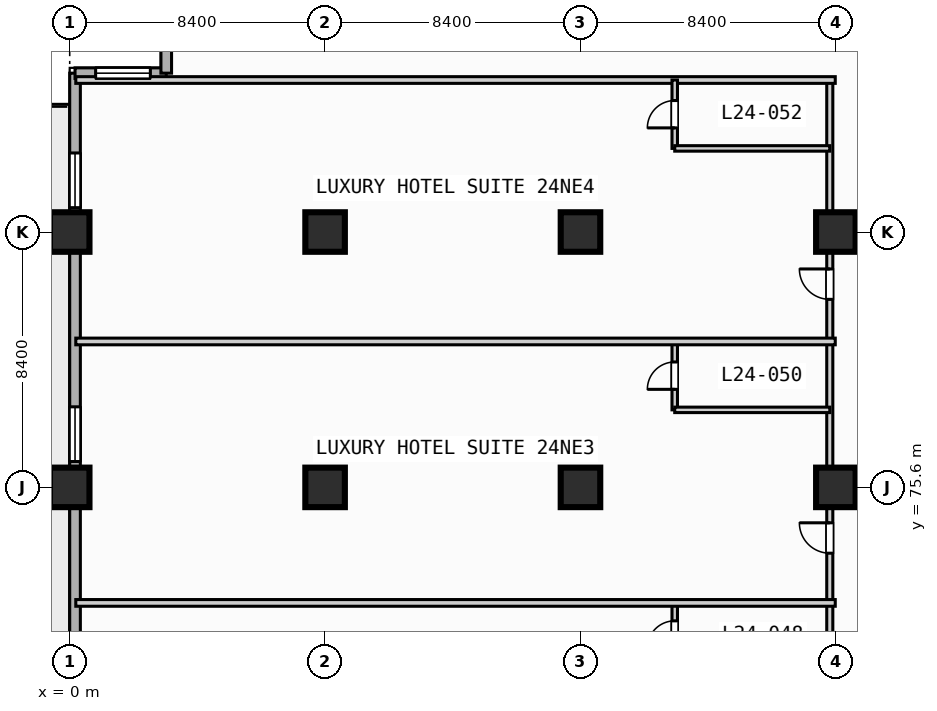
"""IFC4 building model, lengths in metres.
Left out: names, types, materials, properties, quantities, classifications, styles, units other than length and angle.
Written with IfcOpenShell. Run it as: python <this file> out.ifc"""

import sys

from ifc_helpers import new_model, si_unit, direction, frame, frame_2d, origin, origin_2d, place, context, subcontext, project, spatial, rectangle, extrude, element, fill, save


model = new_model("IFC4")
c1 = context("Model", 3, precision=1e-05, world=origin(), true_north=direction((0.0, 1.0)))
c2 = subcontext(c1, "Body", "Model", "MODEL_VIEW")
j1 = project(units=[si_unit("LENGTHUNIT", "METRE"), si_unit("PLANEANGLEUNIT", "RADIAN")], contexts=[c1])
p1 = place(None, origin())
s1 = spatial("IfcSite", under=j1, at=p1, CompositionType="ELEMENT")
p2 = place(p1, origin())
s2 = spatial("IfcBuilding", under=s1, at=p2, CompositionType="ELEMENT")
p3 = place(p2, frame((0.0, 0.0, 103.8)))
s3 = spatial("IfcBuildingStorey", under=s2, at=p3, CompositionType="ELEMENT", Elevation=103.8)
for number, where, z_axis, x_axis in (
    (1, (0.0, 75.6, 0.0), (0.0, 0.0, 1.0), (1.0, 0.0, 0.0)),
    (2, (0.0, 84.0, 0.0), (0.0, 0.0, 1.0), (1.0, 0.0, 0.0)),
    (3, (8.4, 75.6, 0.0), (0.0, 0.0, 1.0), (1.0, 0.0, 0.0)),
    (4, (8.4, 84.0, 0.0), (0.0, 0.0, 1.0), (1.0, 0.0, 0.0)),
    (5, (16.8, 75.6, 0.0), (0.0, 0.0, 1.0), (1.0, 0.0, 0.0)),
    (6, (16.8, 84.0, 0.0), (0.0, 0.0, 1.0), (1.0, 0.0, 0.0)),
    (7, (25.2, 75.6, 0.0), (0.0, 0.0, 1.0), (1.0, 0.0, 0.0)),
    (8, (25.2, 84.0, 0.0), (0.0, 0.0, 1.0), (1.0, 0.0, 0.0)),
):
    element("IfcColumn", number, at=place(p3, frame(where, z_axis=z_axis, x_axis=x_axis)), inside=s3, PredefinedType="COLUMN", context=c2, shape_type="SweptSolid", body=[
        extrude(rectangle(XDim=1.3, YDim=1.3, at=origin_2d()), origin(), (0.0, 0.0, 1.0), 3.8),
    ])
p4 = place(p3, frame((0.175, 3.175, 0.0), z_axis=(0.0, 0.0, 1.0), x_axis=(0.0, 1.0, 0.0)))
e9 = element("IfcWall", 9, at=p4, inside=s3, PredefinedType="STANDARD", context=c2, shape_type="SweptSolid", body=[
    extrude(rectangle(XDim=86.05, YDim=0.35, at=frame_2d((43.025, 0.0))), origin(), (0.0, 0.0, 1.0), 3.55),
])
p5 = place(p4, frame((42.325, 0.0, 0.0)))
e10 = element("IfcOpeningElement", 10, at=p5, cuts=e9, PredefinedType="OPENING", context=c2, shape_type="SweptSolid", body=[
    extrude(rectangle(XDim=1.4, YDim=2.2, at=frame_2d((0.7, 1.1))), frame((0.0, 0.185, 0.0), z_axis=(0.0, -1.0, 0.0), x_axis=(1.0, 0.0, 0.0)), (0.0, 0.0, 1.0), 0.37),
])
p6 = place(p4, frame((25.125, 0.0, 0.85)))
e11 = element("IfcOpeningElement", 11, at=p6, cuts=e9, PredefinedType="OPENING", context=c2, shape_type="SweptSolid", body=[
    extrude(rectangle(XDim=2.2, YDim=1.8, at=frame_2d((1.1, 0.9))), frame((0.0, 0.185, 0.0), z_axis=(0.0, -1.0, 0.0), x_axis=(1.0, 0.0, 0.0)), (0.0, 0.0, 1.0), 0.37),
])
p7 = place(p4, frame((33.525, 0.0, 0.85)))
e12 = element("IfcOpeningElement", 12, at=p7, cuts=e9, PredefinedType="OPENING", context=c2, shape_type="SweptSolid", body=[
    extrude(rectangle(XDim=2.2, YDim=1.8, at=frame_2d((1.1, 0.9))), frame((0.0, 0.185, 0.0), z_axis=(0.0, -1.0, 0.0), x_axis=(1.0, 0.0, 0.0)), (0.0, 0.0, 1.0), 0.37),
])
p8 = place(p4, frame((58.725, 0.0, 0.85)))
e13 = element("IfcOpeningElement", 13, at=p8, cuts=e9, PredefinedType="OPENING", context=c2, shape_type="SweptSolid", body=[
    extrude(rectangle(XDim=2.2, YDim=1.8, at=frame_2d((1.1, 0.9))), frame((0.0, 0.185, 0.0), z_axis=(0.0, -1.0, 0.0), x_axis=(1.0, 0.0, 0.0)), (0.0, 0.0, 1.0), 0.37),
])
p9 = place(p4, frame((65.125, 0.0, 0.85)))
e14 = element("IfcOpeningElement", 14, at=p9, cuts=e9, PredefinedType="OPENING", context=c2, shape_type="SweptSolid", body=[
    extrude(rectangle(XDim=1.8, YDim=1.8, at=frame_2d((0.9, 0.9))), frame((0.0, 0.185, 0.0), z_axis=(0.0, -1.0, 0.0), x_axis=(1.0, 0.0, 0.0)), (0.0, 0.0, 1.0), 0.37),
])
p10 = place(p4, frame((73.275, 0.0, 0.85)))
e15 = element("IfcOpeningElement", 15, at=p10, cuts=e9, PredefinedType="OPENING", context=c2, shape_type="SweptSolid", body=[
    extrude(rectangle(XDim=1.8, YDim=1.8, at=frame_2d((0.9, 0.9))), frame((0.0, 0.185, 0.0), z_axis=(0.0, -1.0, 0.0), x_axis=(1.0, 0.0, 0.0)), (0.0, 0.0, 1.0), 0.37),
])
p11 = place(p4, frame((81.625, 0.0, 0.85)))
e16 = element("IfcOpeningElement", 16, at=p11, cuts=e9, PredefinedType="OPENING", context=c2, shape_type="SweptSolid", body=[
    extrude(rectangle(XDim=1.8, YDim=1.8, at=frame_2d((0.9, 0.9))), frame((0.0, 0.185, 0.0), z_axis=(0.0, -1.0, 0.0), x_axis=(1.0, 0.0, 0.0)), (0.0, 0.0, 1.0), 0.37),
])
p12 = place(p3, frame((0.175, 89.225, 0.0), z_axis=(0.0, 0.0, 1.0), x_axis=(1.0, 0.0, 0.0)))
e17 = element("IfcWall", 17, at=p12, inside=s3, PredefinedType="STANDARD", context=c2, shape_type="SweptSolid", body=[
    extrude(rectangle(XDim=3.0, YDim=0.35, at=frame_2d((1.5, 0.0))), origin(), (0.0, 0.0, 1.0), 3.55),
])
p13 = place(p12, frame((0.677, 0.0, 0.85)))
e18 = element("IfcOpeningElement", 18, at=p13, cuts=e17, PredefinedType="OPENING", context=c2, shape_type="SweptSolid", body=[
    extrude(rectangle(XDim=1.8, YDim=1.8, at=frame_2d((0.9, 0.9))), frame((0.0, 0.185, 0.0), z_axis=(0.0, -1.0, 0.0), x_axis=(1.0, 0.0, 0.0)), (0.0, 0.0, 1.0), 0.37),
])
p14 = place(p3, frame((3.175, 89.225, 0.0), z_axis=(0.0, 0.0, 1.0), x_axis=(0.0, 1.0, 0.0)))
e19 = element("IfcWall", 19, at=p14, inside=s3, PredefinedType="STANDARD", context=c2, shape_type="SweptSolid", body=[
    extrude(rectangle(XDim=3.0, YDim=0.35, at=frame_2d((1.5, 0.0))), origin(), (0.0, 0.0, 1.0), 3.55),
])
p15 = place(p3, frame((25.0, 61.4, 0.0), z_axis=(0.0, 0.0, 1.0), x_axis=(0.0, 1.0, 0.0)))
e20 = element("IfcWall", 20, at=p15, inside=s3, PredefinedType="PARTITIONING", context=c2, shape_type="SweptSolid", body=[
    extrude(rectangle(XDim=27.6, YDim=0.2, at=frame_2d((13.8, 0.0))), origin(), (0.0, 0.0, 1.0), 2.8),
])
p16 = place(p15, frame((3.18, 0.0, 0.0)))
e21 = element("IfcOpeningElement", 21, at=p16, cuts=e20, PredefinedType="OPENING", context=c2, shape_type="SweptSolid", body=[
    extrude(rectangle(XDim=1.0, YDim=2.15, at=frame_2d((0.5, 1.075))), frame((0.0, 0.11, 0.0), z_axis=(0.0, -1.0, 0.0), x_axis=(1.0, 0.0, 0.0)), (0.0, 0.0, 1.0), 0.22),
])
p17 = place(p15, frame((6.97, 0.0, 0.0)))
e22 = element("IfcOpeningElement", 22, at=p17, cuts=e20, PredefinedType="OPENING", context=c2, shape_type="SweptSolid", body=[
    extrude(rectangle(XDim=1.0, YDim=2.15, at=frame_2d((0.5, 1.075))), frame((0.0, 0.11, 0.0), z_axis=(0.0, -1.0, 0.0), x_axis=(1.0, 0.0, 0.0)), (0.0, 0.0, 1.0), 0.22),
])
p18 = place(p15, frame((12.035, 0.0, 0.0)))
e23 = element("IfcOpeningElement", 23, at=p18, cuts=e20, PredefinedType="OPENING", context=c2, shape_type="SweptSolid", body=[
    extrude(rectangle(XDim=1.0, YDim=2.15, at=frame_2d((0.5, 1.075))), frame((0.0, 0.11, 0.0), z_axis=(0.0, -1.0, 0.0), x_axis=(1.0, 0.0, 0.0)), (0.0, 0.0, 1.0), 0.22),
])
p19 = place(p15, frame((20.385, 0.0, 0.0)))
e24 = element("IfcOpeningElement", 24, at=p19, cuts=e20, PredefinedType="OPENING", context=c2, shape_type="SweptSolid", body=[
    extrude(rectangle(XDim=1.0, YDim=2.15, at=frame_2d((0.5, 1.075))), frame((0.0, 0.11, 0.0), z_axis=(0.0, -1.0, 0.0), x_axis=(1.0, 0.0, 0.0)), (0.0, 0.0, 1.0), 0.22),
])
p20 = place(p3, frame((19.9, 69.72, 0.0), z_axis=(0.0, 0.0, 1.0), x_axis=(0.0, 1.0, 0.0)))
e25 = element("IfcWall", 25, at=p20, inside=s3, PredefinedType="PLUMBINGWALL", context=c2, shape_type="SweptSolid", body=[
    extrude(rectangle(XDim=2.08, YDim=0.18, at=frame_2d((1.04, 0.0))), origin(), (0.0, 0.0, 1.0), 3.55),
])
p21 = place(p20, frame((0.59, 0.0, 0.0)))
e26 = element("IfcOpeningElement", 26, at=p21, cuts=e25, PredefinedType="OPENING", context=c2, shape_type="SweptSolid", body=[
    extrude(rectangle(XDim=0.9, YDim=2.1, at=frame_2d((0.45, 1.05))), frame((0.0, 0.1, 0.0), z_axis=(0.0, -1.0, 0.0), x_axis=(1.0, 0.0, 0.0)), (0.0, 0.0, 1.0), 0.2),
])
p22 = place(p3, frame((0.2, 71.8, 0.0), z_axis=(0.0, 0.0, 1.0), x_axis=(1.0, 0.0, 0.0)))
e27 = element("IfcWall", 27, at=p22, inside=s3, PredefinedType="PARTITIONING", context=c2, shape_type="SweptSolid", body=[
    extrude(rectangle(XDim=24.98, YDim=0.22, at=frame_2d((12.49, 0.0))), origin(), (0.0, 0.0, 1.0), 3.55),
])
p23 = place(p3, frame((19.9, 78.15, 0.0), z_axis=(0.0, 0.0, 1.0), x_axis=(0.0, 1.0, 0.0)))
e28 = element("IfcWall", 28, at=p23, inside=s3, PredefinedType="PLUMBINGWALL", context=c2, shape_type="SweptSolid", body=[
    extrude(rectangle(XDim=2.25, YDim=0.18, at=frame_2d((1.125, 0.0))), origin(), (0.0, 0.0, 1.0), 3.55),
])
p24 = place(p23, frame((0.675, 0.0, 0.0)))
e29 = element("IfcOpeningElement", 29, at=p24, cuts=e28, PredefinedType="OPENING", context=c2, shape_type="SweptSolid", body=[
    extrude(rectangle(XDim=0.9, YDim=2.1, at=frame_2d((0.45, 1.05))), frame((0.0, 0.1, 0.0), z_axis=(0.0, -1.0, 0.0), x_axis=(1.0, 0.0, 0.0)), (0.0, 0.0, 1.0), 0.2),
])
p25 = place(p3, frame((19.9, 78.15, 0.0), z_axis=(0.0, 0.0, 1.0), x_axis=(1.0, 0.0, 0.0)))
e30 = element("IfcWall", 30, at=p25, inside=s3, PredefinedType="PLUMBINGWALL", context=c2, shape_type="SweptSolid", body=[
    extrude(rectangle(XDim=5.1, YDim=0.18, at=frame_2d((2.55, 0.0))), origin(), (0.0, 0.0, 1.0), 3.55),
])
for number, where, z_axis, x_axis in (
    (31, (0.2, 80.4, 0.0), (0.0, 0.0, 1.0), (1.0, 0.0, 0.0)),
    (32, (0.2, 89.0, 0.0), (0.0, 0.0, 1.0), (1.0, 0.0, 0.0)),
):
    element("IfcWall", number, at=place(p3, frame(where, z_axis=z_axis, x_axis=x_axis)), inside=s3, PredefinedType="PARTITIONING", context=c2, shape_type="SweptSolid", body=[
        extrude(rectangle(XDim=24.98, YDim=0.22, at=frame_2d((12.49, 0.0))), origin(), (0.0, 0.0, 1.0), 3.55),
    ])
p26 = place(p3, frame((19.9, 86.75, 0.0), z_axis=(0.0, 0.0, 1.0), x_axis=(0.0, 1.0, 0.0)))
e33 = element("IfcWall", 33, at=p26, inside=s3, PredefinedType="PLUMBINGWALL", context=c2, shape_type="SweptSolid", body=[
    extrude(rectangle(XDim=2.25, YDim=0.18, at=frame_2d((1.125, 0.0))), origin(), (0.0, 0.0, 1.0), 3.55),
])
p27 = place(p26, frame((0.675, 0.0, 0.0)))
e34 = element("IfcOpeningElement", 34, at=p27, cuts=e33, PredefinedType="OPENING", context=c2, shape_type="SweptSolid", body=[
    extrude(rectangle(XDim=0.9, YDim=2.1, at=frame_2d((0.45, 1.05))), frame((0.0, 0.1, 0.0), z_axis=(0.0, -1.0, 0.0), x_axis=(1.0, 0.0, 0.0)), (0.0, 0.0, 1.0), 0.2),
])
p28 = place(p3, frame((19.9, 86.75, 0.0), z_axis=(0.0, 0.0, 1.0), x_axis=(1.0, 0.0, 0.0)))
e35 = element("IfcWall", 35, at=p28, inside=s3, PredefinedType="PLUMBINGWALL", context=c2, shape_type="SweptSolid", body=[
    extrude(rectangle(XDim=5.1, YDim=0.18, at=frame_2d((2.55, 0.0))), origin(), (0.0, 0.0, 1.0), 3.55),
])
p29 = place(p10, origin())
e36 = element("IfcWindow", 36, at=p29, inside=s3, PartitioningType="SINGLE_PANEL", PredefinedType="WINDOW", context=c2, shape_type="SweptSolid", body=[
    extrude(rectangle(XDim=1.8, YDim=1.8, at=frame_2d((0.9, 0.9))), frame((0.0, 0.03, 0.0), z_axis=(0.0, -1.0, 0.0), x_axis=(1.0, 0.0, 0.0)), (0.0, 0.0, 1.0), 0.06),
])
fill(e15, e36)
p30 = place(p11, origin())
e37 = element("IfcWindow", 37, at=p30, inside=s3, PartitioningType="SINGLE_PANEL", PredefinedType="WINDOW", context=c2, shape_type="SweptSolid", body=[
    extrude(rectangle(XDim=1.8, YDim=1.8, at=frame_2d((0.9, 0.9))), frame((0.0, 0.03, 0.0), z_axis=(0.0, -1.0, 0.0), x_axis=(1.0, 0.0, 0.0)), (0.0, 0.0, 1.0), 0.06),
])
fill(e16, e37)
p31 = place(p13, origin())
e38 = element("IfcWindow", 38, at=p31, inside=s3, PartitioningType="SINGLE_PANEL", PredefinedType="WINDOW", context=c2, shape_type="SweptSolid", body=[
    extrude(rectangle(XDim=1.8, YDim=1.8, at=frame_2d((0.9, 0.9))), frame((0.0, 0.03, 0.0), z_axis=(0.0, -1.0, 0.0), x_axis=(1.0, 0.0, 0.0)), (0.0, 0.0, 1.0), 0.06),
])
fill(e18, e38)
p32 = place(p18, origin())
e39 = element("IfcDoor", 39, at=p32, inside=s3, OperationType="SINGLE_SWING_RIGHT", PredefinedType="DOOR", context=c2, shape_type="SweptSolid", body=[
    extrude(rectangle(XDim=1.0, YDim=2.15, at=frame_2d((0.5, 1.075))), frame((0.0, 0.025, 0.0), z_axis=(0.0, -1.0, 0.0), x_axis=(1.0, 0.0, 0.0)), (0.0, 0.0, 1.0), 0.05),
])
fill(e23, e39)
p33 = place(p19, origin())
e40 = element("IfcDoor", 40, at=p33, inside=s3, OperationType="SINGLE_SWING_RIGHT", PredefinedType="DOOR", context=c2, shape_type="SweptSolid", body=[
    extrude(rectangle(XDim=1.0, YDim=2.15, at=frame_2d((0.5, 1.075))), frame((0.0, 0.025, 0.0), z_axis=(0.0, -1.0, 0.0), x_axis=(1.0, 0.0, 0.0)), (0.0, 0.0, 1.0), 0.05),
])
fill(e24, e40)
p34 = place(p21, origin())
e41 = element("IfcDoor", 41, at=p34, inside=s3, OperationType="SINGLE_SWING_LEFT", PredefinedType="DOOR", context=c2, shape_type="SweptSolid", body=[
    extrude(rectangle(XDim=0.9, YDim=2.1, at=frame_2d((0.45, 1.05))), frame((0.0, 0.025, 0.0), z_axis=(0.0, -1.0, 0.0), x_axis=(1.0, 0.0, 0.0)), (0.0, 0.0, 1.0), 0.05),
])
fill(e26, e41)
p35 = place(p24, origin())
e42 = element("IfcDoor", 42, at=p35, inside=s3, OperationType="SINGLE_SWING_LEFT", PredefinedType="DOOR", context=c2, shape_type="SweptSolid", body=[
    extrude(rectangle(XDim=0.9, YDim=2.1, at=frame_2d((0.45, 1.05))), frame((0.0, 0.025, 0.0), z_axis=(0.0, -1.0, 0.0), x_axis=(1.0, 0.0, 0.0)), (0.0, 0.0, 1.0), 0.05),
])
fill(e29, e42)
p36 = place(p27, origin())
e43 = element("IfcDoor", 43, at=p36, inside=s3, OperationType="SINGLE_SWING_LEFT", PredefinedType="DOOR", context=c2, shape_type="SweptSolid", body=[
    extrude(rectangle(XDim=0.9, YDim=2.1, at=frame_2d((0.45, 1.05))), frame((0.0, 0.025, 0.0), z_axis=(0.0, -1.0, 0.0), x_axis=(1.0, 0.0, 0.0)), (0.0, 0.0, 1.0), 0.05),
])
fill(e34, e43)
save(model, sys.argv[1])
